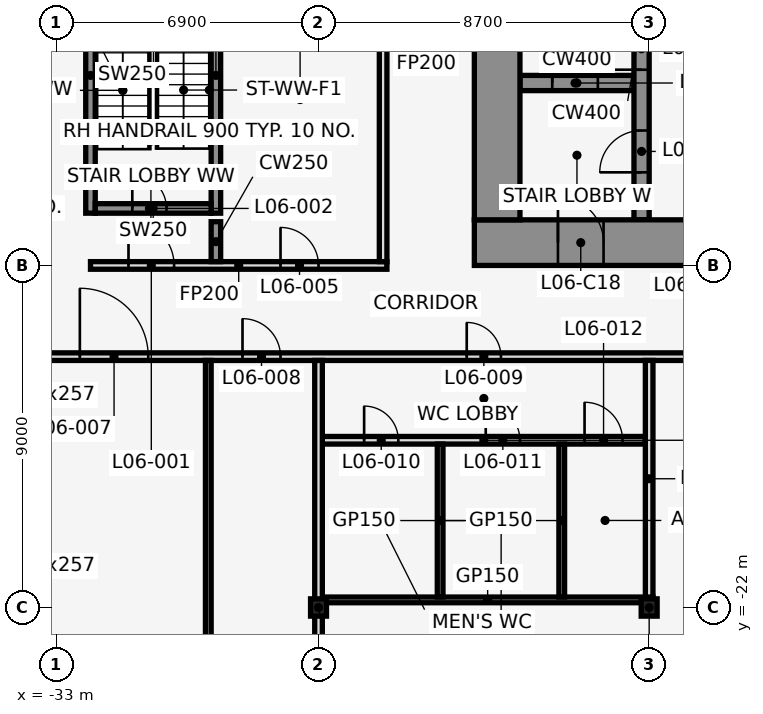
"""IFC4 building model, lengths in metres.
Left out: names, types, materials, properties, quantities, classifications, styles, units other than length and angle.
Written with IfcOpenShell. Run it as: python <this file> out.ifc"""

import sys

from ifc_helpers import new_model, si_unit, direction, frame, frame_2d, origin, origin_2d, place, context, subcontext, project, spatial, rectangle, i_section, extrude, element, fill, save


model = new_model("IFC4")
c1 = context("Model", 3, precision=1e-05, world=origin(), true_north=direction((0.0, 1.0)))
c2 = subcontext(c1, "Body", "Model", "MODEL_VIEW")
j1 = project(units=[si_unit("LENGTHUNIT", "METRE"), si_unit("PLANEANGLEUNIT", "RADIAN")], contexts=[c1])
p1 = place(None, origin())
s1 = spatial("IfcSite", under=j1, at=p1, CompositionType="ELEMENT")
p2 = place(p1, origin())
s2 = spatial("IfcBuilding", under=s1, at=p2, CompositionType="ELEMENT")
p3 = place(p2, frame((0.0, 0.0, 35.0)))
s3 = spatial("IfcBuildingStorey", under=s2, at=p3, CompositionType="ELEMENT", Elevation=35.0)
for number, where, z_axis, x_axis in (
    (1, (-26.1, -22.0, 0.0), (0.0, 0.0, 1.0), (1.0, 0.0, 0.0)),
    (2, (-17.4, -22.0, 0.0), (0.0, 0.0, 1.0), (1.0, 0.0, 0.0)),
):
    element("IfcColumn", number, at=place(p3, frame(where, z_axis=z_axis, x_axis=x_axis)), inside=s3, PredefinedType="COLUMN", context=c2, shape_type="SweptSolid", body=[
        extrude(i_section(OverallWidth=0.419, OverallDepth=0.455, WebThickness=0.042, FlangeThickness=0.068, at=origin_2d()), origin(), (0.0, 0.0, 1.0), 4.5),
    ])
for number, where, z_axis, x_axis in (
    (3, (-32.1, -11.625, 0.0), (0.0, 0.0, 1.0), (0.0, 1.0, 0.0)),
    (4, (-28.8, -11.625, 0.0), (0.0, 0.0, 1.0), (0.0, 1.0, 0.0)),
):
    element("IfcWall", number, at=place(p3, frame(where, z_axis=z_axis, x_axis=x_axis)), inside=s3, PredefinedType="SHEAR", context=c2, shape_type="SweptSolid", body=[
        extrude(rectangle(XDim=7.25, YDim=0.25, at=frame_2d((3.625, 0.0))), origin(), (0.0, 0.0, 1.0), 4.5),
    ])
p4 = place(p3, frame((-31.975, -11.5, 0.0), z_axis=(0.0, 0.0, 1.0), x_axis=(1.0, 0.0, 0.0)))
e5 = element("IfcWall", 5, at=p4, inside=s3, PredefinedType="SHEAR", context=c2, shape_type="SweptSolid", body=[
    extrude(rectangle(XDim=3.05, YDim=0.25, at=frame_2d((1.525, 0.0))), origin(), (0.0, 0.0, 1.0), 4.5),
])
p5 = place(p4, frame((0.975, 0.0, 0.0)))
e6 = element("IfcOpeningElement", 6, at=p5, cuts=e5, PredefinedType="OPENING", context=c2, shape_type="SweptSolid", body=[
    extrude(rectangle(XDim=0.9, YDim=2.1, at=frame_2d((0.45, 1.05))), frame((0.0, 0.137, 0.0), z_axis=(0.0, -1.0, 0.0), x_axis=(1.0, 0.0, 0.0)), (0.0, 0.0, 1.0), 0.274),
])
p6 = place(p3, frame((-26.0, -21.8, 0.0), z_axis=(0.0, 0.0, 1.0), x_axis=(1.0, 0.0, 0.0)))
e7 = element("IfcWall", 7, at=p6, inside=s3, PredefinedType="PARTITIONING", context=c2, shape_type="SweptSolid", body=[
    extrude(rectangle(XDim=8.7, YDim=0.15, at=frame_2d((4.35, 0.0))), origin(), (0.0, 0.0, 1.0), 3.36),
])
p7 = place(p3, frame((-26.0, -17.6, 0.0), z_axis=(0.0, 0.0, 1.0), x_axis=(1.0, 0.0, 0.0)))
e8 = element("IfcWall", 8, at=p7, inside=s3, PredefinedType="PARTITIONING", context=c2, shape_type="SweptSolid", body=[
    extrude(rectangle(XDim=8.5, YDim=0.2, at=frame_2d((4.25, 0.0))), origin(), (0.0, 0.0, 1.0), 3.36),
])
p8 = place(p7, frame((1.1, 0.0, 0.0)))
e9 = element("IfcOpeningElement", 9, at=p8, cuts=e8, PredefinedType="OPENING", context=c2, shape_type="SweptSolid", body=[
    extrude(rectangle(XDim=0.9, YDim=2.1, at=frame_2d((0.45, 1.05))), frame((0.0, 0.112, 0.0), z_axis=(0.0, -1.0, 0.0), x_axis=(1.0, 0.0, 0.0)), (0.0, 0.0, 1.0), 0.224),
])
p9 = place(p7, frame((4.3, 0.0, 0.0)))
e10 = element("IfcOpeningElement", 10, at=p9, cuts=e8, PredefinedType="OPENING", context=c2, shape_type="SweptSolid", body=[
    extrude(rectangle(XDim=0.9, YDim=2.1, at=frame_2d((0.45, 1.05))), frame((0.0, 0.112, 0.0), z_axis=(0.0, -1.0, 0.0), x_axis=(1.0, 0.0, 0.0)), (0.0, 0.0, 1.0), 0.224),
])
p10 = place(p7, frame((6.9, 0.0, 0.0)))
e11 = element("IfcOpeningElement", 11, at=p10, cuts=e8, PredefinedType="OPENING", context=c2, shape_type="SweptSolid", body=[
    extrude(rectangle(XDim=1.0, YDim=2.1, at=frame_2d((0.5, 1.05))), frame((0.0, 0.112, 0.0), z_axis=(0.0, -1.0, 0.0), x_axis=(1.0, 0.0, 0.0)), (0.0, 0.0, 1.0), 0.224),
])
p11 = place(p3, frame((-35.68, -15.4, 0.0), z_axis=(0.0, 0.0, 1.0), x_axis=(1.0, 0.0, 0.0)))
e12 = element("IfcWall", 12, at=p11, inside=s3, PredefinedType="PARTITIONING", context=c2, shape_type="SweptSolid", body=[
    extrude(rectangle(XDim=71.36, YDim=0.2, at=frame_2d((35.68, 0.0))), origin(), (0.0, 0.0, 1.0), 3.36),
])
p12 = place(p11, frame((3.3, 0.0, 0.0)))
e13 = element("IfcOpeningElement", 13, at=p12, cuts=e12, PredefinedType="OPENING", context=c2, shape_type="SweptSolid", body=[
    extrude(rectangle(XDim=1.8, YDim=2.1, at=frame_2d((0.9, 1.05))), frame((0.0, 0.112, 0.0), z_axis=(0.0, -1.0, 0.0), x_axis=(1.0, 0.0, 0.0)), (0.0, 0.0, 1.0), 0.224),
])
p13 = place(p11, frame((7.58, 0.0, 0.0)))
e14 = element("IfcOpeningElement", 14, at=p13, cuts=e12, PredefinedType="OPENING", context=c2, shape_type="SweptSolid", body=[
    extrude(rectangle(XDim=1.0, YDim=2.1, at=frame_2d((0.5, 1.05))), frame((0.0, 0.112, 0.0), z_axis=(0.0, -1.0, 0.0), x_axis=(1.0, 0.0, 0.0)), (0.0, 0.0, 1.0), 0.224),
])
p14 = place(p11, frame((13.48, 0.0, 0.0)))
e15 = element("IfcOpeningElement", 15, at=p14, cuts=e12, PredefinedType="OPENING", context=c2, shape_type="SweptSolid", body=[
    extrude(rectangle(XDim=0.9, YDim=2.1, at=frame_2d((0.45, 1.05))), frame((0.0, 0.112, 0.0), z_axis=(0.0, -1.0, 0.0), x_axis=(1.0, 0.0, 0.0)), (0.0, 0.0, 1.0), 0.224),
])
p15 = place(p11, frame((21.68, 0.0, 0.0)))
e16 = element("IfcOpeningElement", 16, at=p15, cuts=e12, PredefinedType="OPENING", context=c2, shape_type="SweptSolid", body=[
    extrude(rectangle(XDim=1.8, YDim=2.1, at=frame_2d((0.9, 1.05))), frame((0.0, 0.112, 0.0), z_axis=(0.0, -1.0, 0.0), x_axis=(1.0, 0.0, 0.0)), (0.0, 0.0, 1.0), 0.224),
])
p16 = place(p11, frame((30.38, 0.0, 0.0)))
e17 = element("IfcOpeningElement", 17, at=p16, cuts=e12, PredefinedType="OPENING", context=c2, shape_type="SweptSolid", body=[
    extrude(rectangle(XDim=1.8, YDim=2.1, at=frame_2d((0.9, 1.05))), frame((0.0, 0.112, 0.0), z_axis=(0.0, -1.0, 0.0), x_axis=(1.0, 0.0, 0.0)), (0.0, 0.0, 1.0), 0.224),
])
p17 = place(p11, frame((40.58, 0.0, 0.0)))
e18 = element("IfcOpeningElement", 18, at=p17, cuts=e12, PredefinedType="OPENING", context=c2, shape_type="SweptSolid", body=[
    extrude(rectangle(XDim=1.8, YDim=2.1, at=frame_2d((0.9, 1.05))), frame((0.0, 0.112, 0.0), z_axis=(0.0, -1.0, 0.0), x_axis=(1.0, 0.0, 0.0)), (0.0, 0.0, 1.0), 0.224),
])
p18 = place(p11, frame((53.68, 0.0, 0.0)))
e19 = element("IfcOpeningElement", 19, at=p18, cuts=e12, PredefinedType="OPENING", context=c2, shape_type="SweptSolid", body=[
    extrude(rectangle(XDim=1.8, YDim=2.1, at=frame_2d((0.9, 1.05))), frame((0.0, 0.112, 0.0), z_axis=(0.0, -1.0, 0.0), x_axis=(1.0, 0.0, 0.0)), (0.0, 0.0, 1.0), 0.224),
])
p19 = place(p11, frame((65.68, 0.0, 0.0)))
e20 = element("IfcOpeningElement", 20, at=p19, cuts=e12, PredefinedType="OPENING", context=c2, shape_type="SweptSolid", body=[
    extrude(rectangle(XDim=1.8, YDim=2.1, at=frame_2d((0.9, 1.05))), frame((0.0, 0.112, 0.0), z_axis=(0.0, -1.0, 0.0), x_axis=(1.0, 0.0, 0.0)), (0.0, 0.0, 1.0), 0.224),
])
p20 = place(p3, frame((-32.1, -13.0, 0.0), z_axis=(0.0, 0.0, 1.0), x_axis=(1.0, 0.0, 0.0)))
e21 = element("IfcWall", 21, at=p20, inside=s3, PredefinedType="PARTITIONING", context=c2, shape_type="SweptSolid", body=[
    extrude(rectangle(XDim=7.8, YDim=0.2, at=frame_2d((3.9, 0.0))), origin(), (0.0, 0.0, 1.0), 3.36),
])
p21 = place(p20, frame((1.0, 0.0, 0.0)))
e22 = element("IfcOpeningElement", 22, at=p21, cuts=e21, PredefinedType="OPENING", context=c2, shape_type="SweptSolid", body=[
    extrude(rectangle(XDim=1.2, YDim=2.1, at=frame_2d((0.6, 1.05))), frame((0.0, 0.112, 0.0), z_axis=(0.0, -1.0, 0.0), x_axis=(1.0, 0.0, 0.0)), (0.0, 0.0, 1.0), 0.224),
])
p22 = place(p20, frame((5.0, 0.0, 0.0)))
e23 = element("IfcOpeningElement", 23, at=p22, cuts=e21, PredefinedType="OPENING", context=c2, shape_type="SweptSolid", body=[
    extrude(rectangle(XDim=1.0, YDim=2.1, at=frame_2d((0.5, 1.05))), frame((0.0, 0.112, 0.0), z_axis=(0.0, -1.0, 0.0), x_axis=(1.0, 0.0, 0.0)), (0.0, 0.0, 1.0), 0.224),
])
p23 = place(p3, frame((-29.0, -41.79, 0.0), z_axis=(0.0, 0.0, 1.0), x_axis=(0.0, 1.0, 0.0)))
e24 = element("IfcWall", 24, at=p23, inside=s3, PredefinedType="PARTITIONING", context=c2, shape_type="SweptSolid", body=[
    extrude(rectangle(XDim=26.29, YDim=0.15, at=frame_2d((13.145, 0.0))), origin(), (0.0, 0.0, 1.0), 3.36),
])
p24 = place(p3, frame((-28.8, -12.9, 0.0), z_axis=(0.0, 0.0, 1.0), x_axis=(0.0, 1.0, 0.0)))
e25 = element("IfcWall", 25, at=p24, inside=s3, PredefinedType="SHEAR", context=c2, shape_type="SweptSolid", body=[
    extrude(rectangle(XDim=1.05, YDim=0.25, at=frame_2d((0.525, 0.0))), origin(), (0.0, 0.0, 1.0), 4.5),
])
p25 = place(p3, frame((-26.1, -41.79, 0.0), z_axis=(0.0, 0.0, 1.0), x_axis=(0.0, 1.0, 0.0)))
e26 = element("IfcWall", 26, at=p25, inside=s3, PredefinedType="PARTITIONING", context=c2, shape_type="SweptSolid", body=[
    extrude(rectangle(XDim=26.29, YDim=0.2, at=frame_2d((13.145, 0.0))), origin(), (0.0, 0.0, 1.0), 3.36),
])
p26 = place(p3, frame((-24.4, -12.9, 0.0), z_axis=(0.0, 0.0, 1.0), x_axis=(0.0, 1.0, 0.0)))
e27 = element("IfcWall", 27, at=p26, inside=s3, PredefinedType="PARTITIONING", context=c2, shape_type="SweptSolid", body=[
    extrude(rectangle(XDim=12.69, YDim=0.2, at=frame_2d((6.345, 0.0))), origin(), (0.0, 0.0, 1.0), 3.36),
])
for number, where, z_axis, x_axis in (
    (28, (-22.9, -21.725, 0.0), (0.0, 0.0, 1.0), (0.0, 1.0, 0.0)),
    (29, (-19.7, -21.725, 0.0), (0.0, 0.0, 1.0), (0.0, 1.0, 0.0)),
):
    element("IfcWall", number, at=place(p3, frame(where, z_axis=z_axis, x_axis=x_axis)), inside=s3, PredefinedType="PARTITIONING", context=c2, shape_type="SweptSolid", body=[
        extrude(rectangle(XDim=4.025, YDim=0.15, at=frame_2d((2.013, 0.0))), origin(), (0.0, 0.0, 1.0), 3.36),
    ])
p27 = place(p3, frame((-17.4, -21.725, 0.0), z_axis=(0.0, 0.0, 1.0), x_axis=(0.0, 1.0, 0.0)))
e30 = element("IfcWall", 30, at=p27, inside=s3, PredefinedType="PARTITIONING", context=c2, shape_type="SweptSolid", body=[
    extrude(rectangle(XDim=6.225, YDim=0.2, at=frame_2d((3.113, 0.0))), origin(), (0.0, 0.0, 1.0), 3.36),
])
p28 = place(p3, frame((-20.8, -8.2, 0.0), z_axis=(0.0, 0.0, 1.0), x_axis=(1.0, 0.0, 0.0)))
e31 = element("IfcWall", 31, at=p28, inside=s3, PredefinedType="SHEAR", context=c2, shape_type="SweptSolid", body=[
    extrude(rectangle(XDim=3.0, YDim=0.4, at=frame_2d((1.5, 0.0))), origin(), (0.0, 0.0, 1.0), 4.5),
])
p29 = place(p28, frame((0.85, 0.0, 0.0)))
e32 = element("IfcOpeningElement", 32, at=p29, cuts=e31, PredefinedType="OPENING", context=c2, shape_type="SweptSolid", body=[
    extrude(rectangle(XDim=1.2, YDim=2.1, at=frame_2d((0.6, 1.05))), frame((0.0, 0.212, 0.0), z_axis=(0.0, -1.0, 0.0), x_axis=(1.0, 0.0, 0.0)), (0.0, 0.0, 1.0), 0.424),
])
p30 = place(p3, frame((-17.6, -11.8, 0.0), z_axis=(0.0, 0.0, 1.0), x_axis=(0.0, 1.0, 0.0)))
e33 = element("IfcWall", 33, at=p30, inside=s3, PredefinedType="SHEAR", context=c2, shape_type="SweptSolid", body=[
    extrude(rectangle(XDim=10.6, YDim=0.4, at=frame_2d((5.3, 0.0))), origin(), (0.0, 0.0, 1.0), 4.5),
])
p31 = place(p30, frame((1.25, 0.0, 0.0)))
e34 = element("IfcOpeningElement", 34, at=p31, cuts=e33, PredefinedType="OPENING", context=c2, shape_type="SweptSolid", body=[
    extrude(rectangle(XDim=1.1, YDim=2.1, at=frame_2d((0.55, 1.05))), frame((0.0, 0.212, 0.0), z_axis=(0.0, -1.0, 0.0), x_axis=(1.0, 0.0, 0.0)), (0.0, 0.0, 1.0), 0.424),
])
p32 = place(p30, frame((3.95, 0.0, 0.0)))
e35 = element("IfcOpeningElement", 35, at=p32, cuts=e33, PredefinedType="OPENING", context=c2, shape_type="SweptSolid", body=[
    extrude(rectangle(XDim=1.1, YDim=2.1, at=frame_2d((0.55, 1.05))), frame((0.0, 0.212, 0.0), z_axis=(0.0, -1.0, 0.0), x_axis=(1.0, 0.0, 0.0)), (0.0, 0.0, 1.0), 0.424),
])
p33 = place(p3, frame((-22.0, -12.4, 0.0), z_axis=(0.0, 0.0, 1.0), x_axis=(1.0, 0.0, 0.0)))
e36 = element("IfcWall", 36, at=p33, inside=s3, PredefinedType="SHEAR", context=c2, shape_type="SweptSolid", body=[
    extrude(rectangle(XDim=44.0, YDim=1.2, at=frame_2d((22.0, 0.0))), origin(), (0.0, 0.0, 1.0), 4.5),
])
p34 = place(p33, frame((2.2, 0.0, 0.0)))
e37 = element("IfcOpeningElement", 37, at=p34, cuts=e36, PredefinedType="OPENING", context=c2, shape_type="SweptSolid", body=[
    extrude(rectangle(XDim=1.2, YDim=2.1, at=frame_2d((0.6, 1.05))), frame((0.0, 0.612, 0.0), z_axis=(0.0, -1.0, 0.0), x_axis=(1.0, 0.0, 0.0)), (0.0, 0.0, 1.0), 1.224),
])
p35 = place(p33, frame((21.4, 0.0, 0.0)))
e38 = element("IfcOpeningElement", 38, at=p35, cuts=e36, PredefinedType="OPENING", context=c2, shape_type="SweptSolid", body=[
    extrude(rectangle(XDim=1.2, YDim=2.1, at=frame_2d((0.6, 1.05))), frame((0.0, 0.612, 0.0), z_axis=(0.0, -1.0, 0.0), x_axis=(1.0, 0.0, 0.0)), (0.0, 0.0, 1.0), 1.224),
])
p36 = place(p33, frame((40.6, 0.0, 0.0)))
e39 = element("IfcOpeningElement", 39, at=p36, cuts=e36, PredefinedType="OPENING", context=c2, shape_type="SweptSolid", body=[
    extrude(rectangle(XDim=1.2, YDim=2.1, at=frame_2d((0.6, 1.05))), frame((0.0, 0.612, 0.0), z_axis=(0.0, -1.0, 0.0), x_axis=(1.0, 0.0, 0.0)), (0.0, 0.0, 1.0), 1.224),
])
p37 = place(p33, frame((16.0, 0.0, 0.0)))
e40 = element("IfcOpeningElement", 40, at=p37, cuts=e36, PredefinedType="OPENING", context=c2, shape_type="SweptSolid", body=[
    extrude(rectangle(XDim=1.8, YDim=2.1, at=frame_2d((0.9, 1.05))), frame((0.0, 0.612, 0.0), z_axis=(0.0, -1.0, 0.0), x_axis=(1.0, 0.0, 0.0)), (0.0, 0.0, 1.0), 1.224),
])
p38 = place(p33, frame((6.3, 0.0, 0.0)))
e41 = element("IfcOpeningElement", 41, at=p38, cuts=e36, PredefinedType="OPENING", context=c2, shape_type="SweptSolid", body=[
    extrude(rectangle(XDim=1.2, YDim=2.1, at=frame_2d((0.6, 1.05))), frame((0.0, 0.612, 0.0), z_axis=(0.0, -1.0, 0.0), x_axis=(1.0, 0.0, 0.0)), (0.0, 0.0, 1.0), 1.224),
])
p39 = place(p33, frame((26.2, 0.0, 0.0)))
e42 = element("IfcOpeningElement", 42, at=p39, cuts=e36, PredefinedType="OPENING", context=c2, shape_type="SweptSolid", body=[
    extrude(rectangle(XDim=1.8, YDim=2.1, at=frame_2d((0.9, 1.05))), frame((0.0, 0.612, 0.0), z_axis=(0.0, -1.0, 0.0), x_axis=(1.0, 0.0, 0.0)), (0.0, 0.0, 1.0), 1.224),
])
p40 = place(p33, frame((36.5, 0.0, 0.0)))
e43 = element("IfcOpeningElement", 43, at=p40, cuts=e36, PredefinedType="OPENING", context=c2, shape_type="SweptSolid", body=[
    extrude(rectangle(XDim=1.2, YDim=2.1, at=frame_2d((0.6, 1.05))), frame((0.0, 0.612, 0.0), z_axis=(0.0, -1.0, 0.0), x_axis=(1.0, 0.0, 0.0)), (0.0, 0.0, 1.0), 1.224),
])
p41 = place(p3, frame((-21.4, -11.8, 0.0), z_axis=(0.0, 0.0, 1.0), x_axis=(0.0, 1.0, 0.0)))
e44 = element("IfcWall", 44, at=p41, inside=s3, PredefinedType="SHEAR", context=c2, shape_type="SweptSolid", body=[
    extrude(rectangle(XDim=10.6, YDim=1.2, at=frame_2d((5.3, 0.0))), origin(), (0.0, 0.0, 1.0), 4.5),
])
p42 = place(p21, origin())
e45 = element("IfcDoor", 45, at=p42, inside=s3, OperationType="SINGLE_SWING_LEFT", PredefinedType="DOOR", context=c2, shape_type="SweptSolid", body=[
    extrude(rectangle(XDim=1.2, YDim=2.1, at=frame_2d((0.6, 1.05))), frame((0.0, 0.025, 0.0), z_axis=(0.0, -1.0, 0.0), x_axis=(1.0, 0.0, 0.0)), (0.0, 0.0, 1.0), 0.05),
])
fill(e22, e45)
p43 = place(p5, origin())
e46 = element("IfcDoor", 46, at=p43, inside=s3, OperationType="SINGLE_SWING_LEFT", PredefinedType="DOOR", context=c2, shape_type="SweptSolid", body=[
    extrude(rectangle(XDim=0.9, YDim=2.1, at=frame_2d((0.45, 1.05))), frame((0.0, 0.025, 0.0), z_axis=(0.0, -1.0, 0.0), x_axis=(1.0, 0.0, 0.0)), (0.0, 0.0, 1.0), 0.05),
])
fill(e6, e46)
p44 = place(p22, origin())
e47 = element("IfcDoor", 47, at=p44, inside=s3, OperationType="SINGLE_SWING_LEFT", PredefinedType="DOOR", context=c2, shape_type="SweptSolid", body=[
    extrude(rectangle(XDim=1.0, YDim=2.1, at=frame_2d((0.5, 1.05))), frame((0.0, 0.025, 0.0), z_axis=(0.0, -1.0, 0.0), x_axis=(1.0, 0.0, 0.0)), (0.0, 0.0, 1.0), 0.05),
])
fill(e23, e47)
p45 = place(p12, origin())
e48 = element("IfcDoor", 48, at=p45, inside=s3, OperationType="SINGLE_SWING_LEFT", PredefinedType="DOOR", context=c2, shape_type="SweptSolid", body=[
    extrude(rectangle(XDim=1.8, YDim=2.1, at=frame_2d((0.9, 1.05))), frame((0.0, 0.025, 0.0), z_axis=(0.0, -1.0, 0.0), x_axis=(1.0, 0.0, 0.0)), (0.0, 0.0, 1.0), 0.05),
])
fill(e13, e48)
p46 = place(p13, frame((1.0, 0.0, 0.0), z_axis=(0.0, 0.0, 1.0), x_axis=(-1.0, 0.0, 0.0)))
e49 = element("IfcDoor", 49, at=p46, inside=s3, OperationType="SINGLE_SWING_RIGHT", PredefinedType="DOOR", context=c2, shape_type="SweptSolid", body=[
    extrude(rectangle(XDim=1.0, YDim=2.1, at=frame_2d((0.5, 1.05))), frame((0.0, 0.025, 0.0), z_axis=(0.0, -1.0, 0.0), x_axis=(1.0, 0.0, 0.0)), (0.0, 0.0, 1.0), 0.05),
])
fill(e14, e49)
p47 = place(p14, frame((0.9, 0.0, 0.0), z_axis=(0.0, 0.0, 1.0), x_axis=(-1.0, 0.0, 0.0)))
e50 = element("IfcDoor", 50, at=p47, inside=s3, OperationType="SINGLE_SWING_RIGHT", PredefinedType="DOOR", context=c2, shape_type="SweptSolid", body=[
    extrude(rectangle(XDim=0.9, YDim=2.1, at=frame_2d((0.45, 1.05))), frame((0.0, 0.025, 0.0), z_axis=(0.0, -1.0, 0.0), x_axis=(1.0, 0.0, 0.0)), (0.0, 0.0, 1.0), 0.05),
])
fill(e15, e50)
p48 = place(p8, frame((0.9, 0.0, 0.0), z_axis=(0.0, 0.0, 1.0), x_axis=(-1.0, 0.0, 0.0)))
e51 = element("IfcDoor", 51, at=p48, inside=s3, OperationType="SINGLE_SWING_LEFT", PredefinedType="DOOR", context=c2, shape_type="SweptSolid", body=[
    extrude(rectangle(XDim=0.9, YDim=2.1, at=frame_2d((0.45, 1.05))), frame((0.0, 0.025, 0.0), z_axis=(0.0, -1.0, 0.0), x_axis=(1.0, 0.0, 0.0)), (0.0, 0.0, 1.0), 0.05),
])
fill(e9, e51)
p49 = place(p9, frame((0.9, 0.0, 0.0), z_axis=(0.0, 0.0, 1.0), x_axis=(-1.0, 0.0, 0.0)))
e52 = element("IfcDoor", 52, at=p49, inside=s3, OperationType="SINGLE_SWING_RIGHT", PredefinedType="DOOR", context=c2, shape_type="SweptSolid", body=[
    extrude(rectangle(XDim=0.9, YDim=2.1, at=frame_2d((0.45, 1.05))), frame((0.0, 0.025, 0.0), z_axis=(0.0, -1.0, 0.0), x_axis=(1.0, 0.0, 0.0)), (0.0, 0.0, 1.0), 0.05),
])
fill(e10, e52)
p50 = place(p10, frame((1.0, 0.0, 0.0), z_axis=(0.0, 0.0, 1.0), x_axis=(-1.0, 0.0, 0.0)))
e53 = element("IfcDoor", 53, at=p50, inside=s3, OperationType="SINGLE_SWING_RIGHT", PredefinedType="DOOR", context=c2, shape_type="SweptSolid", body=[
    extrude(rectangle(XDim=1.0, YDim=2.1, at=frame_2d((0.5, 1.05))), frame((0.0, 0.025, 0.0), z_axis=(0.0, -1.0, 0.0), x_axis=(1.0, 0.0, 0.0)), (0.0, 0.0, 1.0), 0.05),
])
fill(e11, e53)
p51 = place(p29, origin())
e54 = element("IfcDoor", 54, at=p51, inside=s3, OperationType="SINGLE_SWING_LEFT", PredefinedType="DOOR", context=c2, shape_type="SweptSolid", body=[
    extrude(rectangle(XDim=1.2, YDim=2.1, at=frame_2d((0.6, 1.05))), frame((0.0, 0.025, 0.0), z_axis=(0.0, -1.0, 0.0), x_axis=(1.0, 0.0, 0.0)), (0.0, 0.0, 1.0), 0.05),
])
fill(e32, e54)
p52 = place(p31, frame((1.1, 0.0, 0.0), z_axis=(0.0, 0.0, 1.0), x_axis=(-1.0, 0.0, 0.0)))
e55 = element("IfcDoor", 55, at=p52, inside=s3, OperationType="SINGLE_SWING_LEFT", PredefinedType="DOOR", context=c2, shape_type="SweptSolid", body=[
    extrude(rectangle(XDim=1.1, YDim=2.1, at=frame_2d((0.55, 1.05))), frame((0.0, 0.025, 0.0), z_axis=(0.0, -1.0, 0.0), x_axis=(1.0, 0.0, 0.0)), (0.0, 0.0, 1.0), 0.05),
])
fill(e34, e55)
p53 = place(p32, frame((1.1, 0.0, 0.0), z_axis=(0.0, 0.0, 1.0), x_axis=(-1.0, 0.0, 0.0)))
e56 = element("IfcDoor", 56, at=p53, inside=s3, OperationType="SINGLE_SWING_LEFT", PredefinedType="DOOR", context=c2, shape_type="SweptSolid", body=[
    extrude(rectangle(XDim=1.1, YDim=2.1, at=frame_2d((0.55, 1.05))), frame((0.0, 0.025, 0.0), z_axis=(0.0, -1.0, 0.0), x_axis=(1.0, 0.0, 0.0)), (0.0, 0.0, 1.0), 0.05),
])
fill(e35, e56)
p54 = place(p34, frame((1.2, 0.0, 0.0), z_axis=(0.0, 0.0, 1.0), x_axis=(-1.0, 0.0, 0.0)))
e57 = element("IfcDoor", 57, at=p54, inside=s3, OperationType="SINGLE_SWING_RIGHT", PredefinedType="DOOR", context=c2, shape_type="SweptSolid", body=[
    extrude(rectangle(XDim=1.2, YDim=2.1, at=frame_2d((0.6, 1.05))), frame((0.0, 0.025, 0.0), z_axis=(0.0, -1.0, 0.0), x_axis=(1.0, 0.0, 0.0)), (0.0, 0.0, 1.0), 0.05),
])
fill(e37, e57)
save(model, sys.argv[1])
